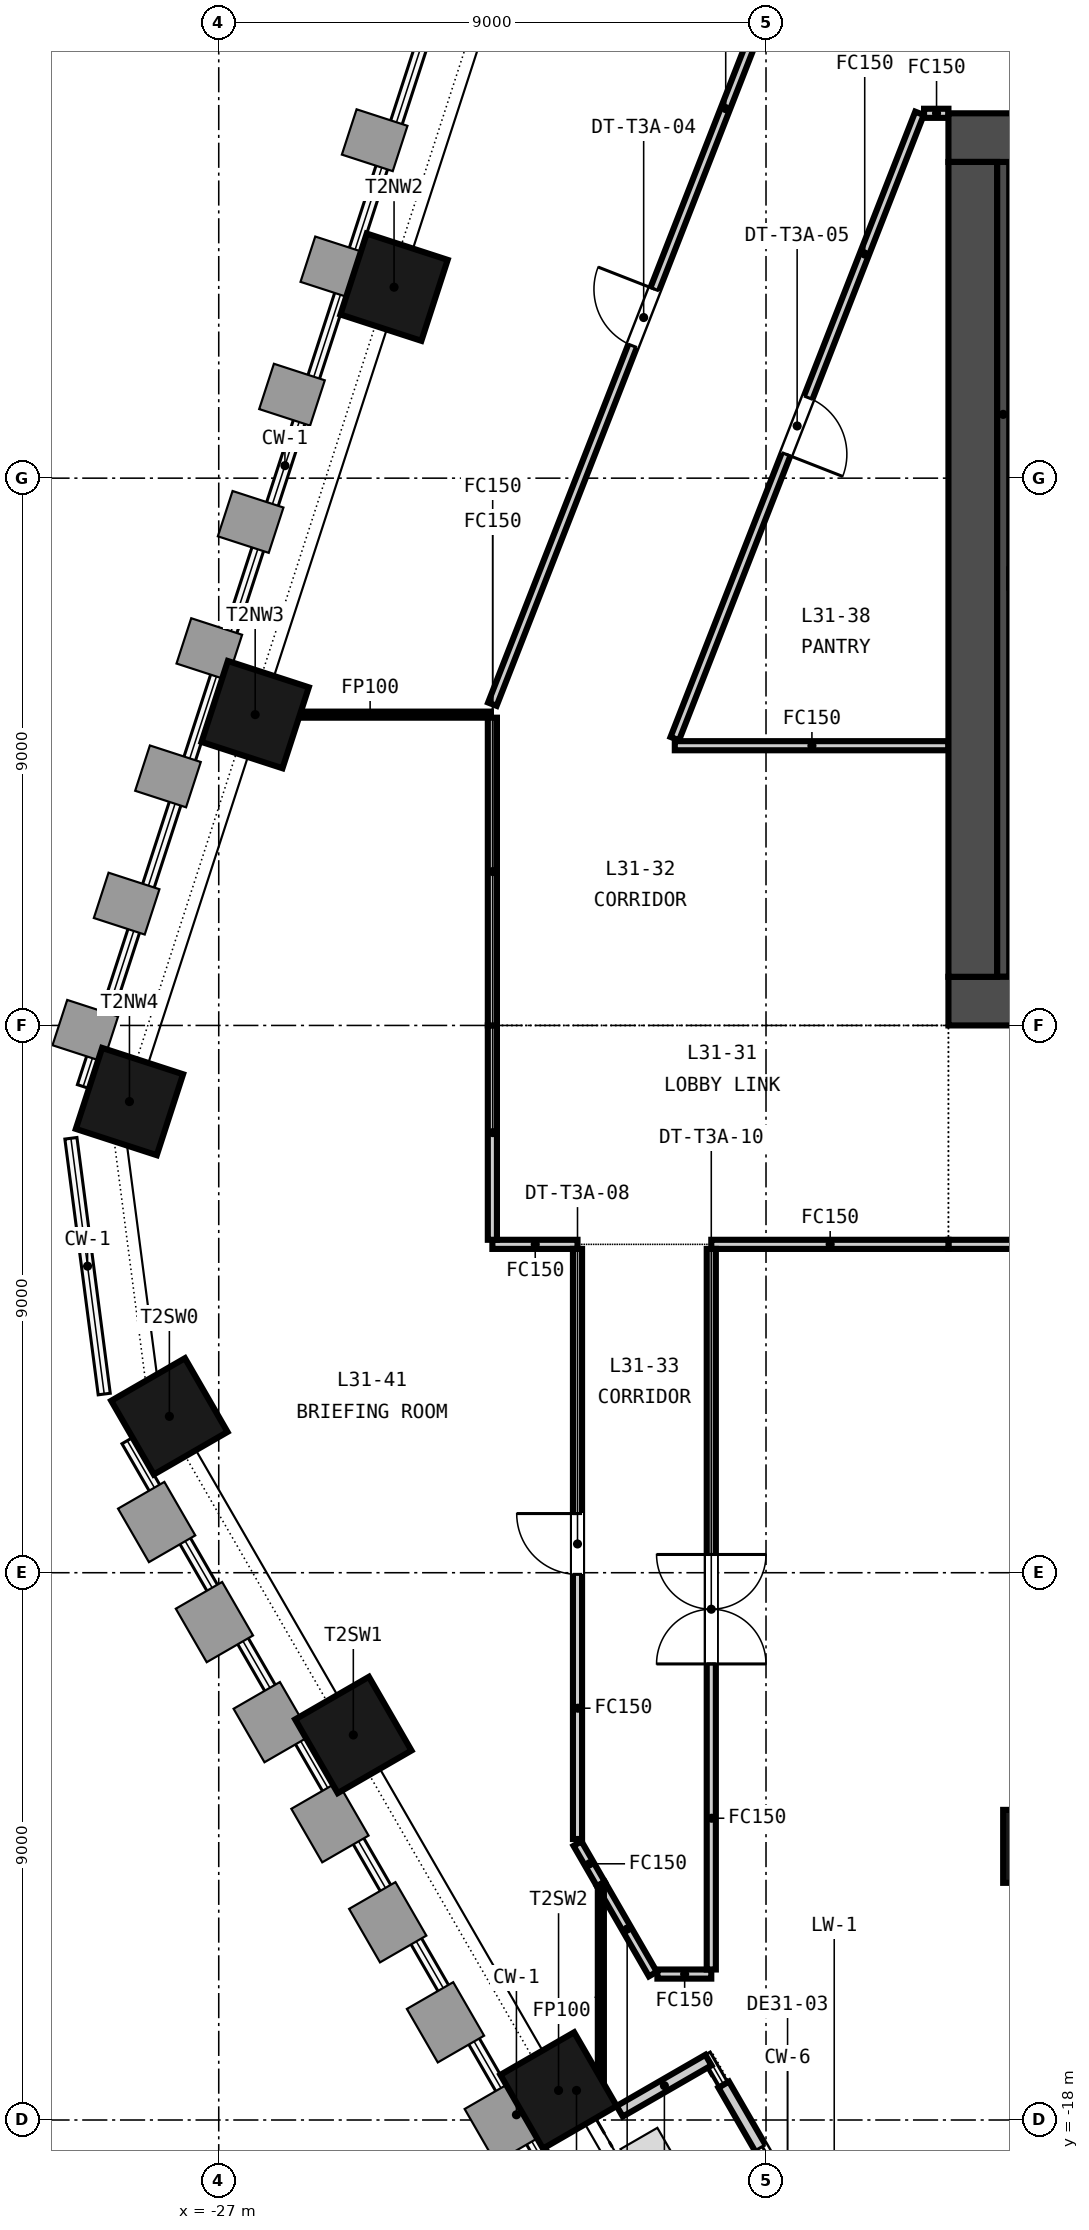
"""IFC4 building model, lengths in metres.
Left out: names, types, materials, properties, quantities, classifications, styles, units other than length and angle.
Written with IfcOpenShell. Run it as: python <this file> out.ifc"""

import sys

from ifc_helpers import new_model, si_unit, direction, frame, frame_2d, origin, origin_2d, place, context, subcontext, project, spatial, rectangle, extrude, element, fill, save


model = new_model("IFC4")
c1 = context("Model", 3, precision=1e-05, world=origin(), true_north=direction((0.0, 1.0)))
c2 = subcontext(c1, "Body", "Model", "MODEL_VIEW")
j1 = project(units=[si_unit("LENGTHUNIT", "METRE"), si_unit("PLANEANGLEUNIT", "RADIAN")], contexts=[c1])
p1 = place(None, origin())
s1 = spatial("IfcSite", under=j1, at=p1, CompositionType="ELEMENT")
p2 = place(p1, origin())
s2 = spatial("IfcBuilding", under=s1, at=p2, CompositionType="ELEMENT")
p3 = place(p2, frame((0.0, 0.0, 129.8)))
s3 = spatial("IfcBuildingStorey", under=s2, at=p3, CompositionType="ELEMENT", Elevation=129.8)
p4 = place(p3, frame((-15.0, 0.4, -0.15), z_axis=(0.0, 0.0, 1.0), x_axis=(1.0, 0.0, 0.0)))
e1 = element("IfcWall", 1, at=p4, inside=s3, PredefinedType="SOLIDWALL", context=c2, shape_type="SweptSolid", body=[
    extrude(rectangle(XDim=30.0, YDim=0.8, at=frame_2d((15.0, 0.0))), origin(), (0.0, 0.0, 1.0), 3.65),
])
p5 = place(p4, frame((5.8, 0.0, 0.15)))
e2 = element("IfcOpeningElement", 2, at=p5, cuts=e1, PredefinedType="OPENING", context=c2, shape_type="SweptSolid", body=[
    extrude(rectangle(XDim=2.4, YDim=2.4, at=frame_2d((1.2, 1.2))), frame((0.0, 0.41, 0.0), z_axis=(0.0, -1.0, 0.0), x_axis=(1.0, 0.0, 0.0)), (0.0, 0.0, 1.0), 0.82),
])
p6 = place(p4, frame((13.8, 0.0, 0.15)))
e3 = element("IfcOpeningElement", 3, at=p6, cuts=e1, PredefinedType="OPENING", context=c2, shape_type="SweptSolid", body=[
    extrude(rectangle(XDim=2.4, YDim=2.4, at=frame_2d((1.2, 1.2))), frame((0.0, 0.41, 0.0), z_axis=(0.0, -1.0, 0.0), x_axis=(1.0, 0.0, 0.0)), (0.0, 0.0, 1.0), 0.82),
])
p7 = place(p4, frame((21.8, 0.0, 0.15)))
e4 = element("IfcOpeningElement", 4, at=p7, cuts=e1, PredefinedType="OPENING", context=c2, shape_type="SweptSolid", body=[
    extrude(rectangle(XDim=2.4, YDim=2.4, at=frame_2d((1.2, 1.2))), frame((0.0, 0.41, 0.0), z_axis=(0.0, -1.0, 0.0), x_axis=(1.0, 0.0, 0.0)), (0.0, 0.0, 1.0), 0.82),
])
p8 = place(p4, frame((1.5, 0.0, 0.15)))
e5 = element("IfcOpeningElement", 5, at=p8, cuts=e1, PredefinedType="OPENING", context=c2, shape_type="SweptSolid", body=[
    extrude(rectangle(XDim=1.2, YDim=2.1, at=frame_2d((0.6, 1.05))), frame((0.0, 0.41, 0.0), z_axis=(0.0, -1.0, 0.0), x_axis=(1.0, 0.0, 0.0)), (0.0, 0.0, 1.0), 0.82),
])
p9 = place(p4, frame((27.3, 0.0, 0.15)))
e6 = element("IfcOpeningElement", 6, at=p9, cuts=e1, PredefinedType="OPENING", context=c2, shape_type="SweptSolid", body=[
    extrude(rectangle(XDim=1.2, YDim=2.1, at=frame_2d((0.6, 1.05))), frame((0.0, 0.41, 0.0), z_axis=(0.0, -1.0, 0.0), x_axis=(1.0, 0.0, 0.0)), (0.0, 0.0, 1.0), 0.82),
])
p10 = place(p3, frame((-15.0, 14.6, -0.15), z_axis=(0.0, 0.0, 1.0), x_axis=(1.0, 0.0, 0.0)))
e7 = element("IfcWall", 7, at=p10, inside=s3, PredefinedType="SOLIDWALL", context=c2, shape_type="SweptSolid", body=[
    extrude(rectangle(XDim=30.0, YDim=0.8, at=frame_2d((15.0, 0.0))), origin(), (0.0, 0.0, 1.0), 3.65),
])
p11 = place(p10, frame((9.25, 0.0, 0.15)))
e8 = element("IfcOpeningElement", 8, at=p11, cuts=e7, PredefinedType="OPENING", context=c2, shape_type="SweptSolid", body=[
    extrude(rectangle(XDim=1.5, YDim=2.1, at=frame_2d((0.75, 1.05))), frame((0.0, 0.41, 0.0), z_axis=(0.0, -1.0, 0.0), x_axis=(1.0, 0.0, 0.0)), (0.0, 0.0, 1.0), 0.82),
])
p12 = place(p10, frame((19.4, 0.0, 0.15)))
e9 = element("IfcOpeningElement", 9, at=p12, cuts=e7, PredefinedType="OPENING", context=c2, shape_type="SweptSolid", body=[
    extrude(rectangle(XDim=1.5, YDim=2.1, at=frame_2d((0.75, 1.05))), frame((0.0, 0.41, 0.0), z_axis=(0.0, -1.0, 0.0), x_axis=(1.0, 0.0, 0.0)), (0.0, 0.0, 1.0), 0.82),
])
p13 = place(p10, frame((1.5, 0.0, 0.15)))
e10 = element("IfcOpeningElement", 10, at=p13, cuts=e7, PredefinedType="OPENING", context=c2, shape_type="SweptSolid", body=[
    extrude(rectangle(XDim=1.2, YDim=2.1, at=frame_2d((0.6, 1.05))), frame((0.0, 0.41, 0.0), z_axis=(0.0, -1.0, 0.0), x_axis=(1.0, 0.0, 0.0)), (0.0, 0.0, 1.0), 0.82),
])
p14 = place(p10, frame((27.3, 0.0, 0.15)))
e11 = element("IfcOpeningElement", 11, at=p14, cuts=e7, PredefinedType="OPENING", context=c2, shape_type="SweptSolid", body=[
    extrude(rectangle(XDim=1.2, YDim=2.1, at=frame_2d((0.6, 1.05))), frame((0.0, 0.41, 0.0), z_axis=(0.0, -1.0, 0.0), x_axis=(1.0, 0.0, 0.0)), (0.0, 0.0, 1.0), 0.82),
])
p15 = place(p3, frame((-14.6, 0.8, -0.15), z_axis=(0.0, 0.0, 1.0), x_axis=(0.0, 1.0, 0.0)))
e12 = element("IfcWall", 12, at=p15, inside=s3, PredefinedType="SOLIDWALL", context=c2, shape_type="SweptSolid", body=[
    extrude(rectangle(XDim=13.4, YDim=0.8, at=frame_2d((6.7, 0.0))), origin(), (0.0, 0.0, 1.0), 3.65),
])
for number, where, z_axis, x_axis in (
    (13, (-24.117, 12.141, -0.15), (0.0, 0.0, 1.0), (-0.309, -0.951, 0.0)),
    (14, (-26.401, 5.111, -0.15), (0.0, 0.0, 1.0), (-0.309, -0.951, 0.0)),
    (15, (-28.468, -1.252, -0.15), (0.0, 0.0, 1.0), (-0.309, -0.951, 0.0)),
    (16, (-27.812, -6.429, -0.15), (0.0, 0.0, 1.0), (0.5, -0.866, 0.0)),
    (17, (-24.787, -11.668, -0.15), (0.0, 0.0, 1.0), (0.5, -0.866, 0.0)),
    (18, (-21.412, -17.514, -0.15), (0.0, 0.0, 1.0), (0.5, -0.866, 0.0)),
):
    element("IfcColumn", number, at=place(p3, frame(where, z_axis=z_axis, x_axis=x_axis)), inside=s3, PredefinedType="COLUMN", context=c2, shape_type="SweptSolid", body=[
        extrude(rectangle(XDim=1.4, YDim=1.4, at=origin_2d()), origin(), (0.0, 0.0, 1.0), 3.65),
    ])
p16 = place(p3, frame((-13.5, -13.5, -0.15), z_axis=(0.0, 0.0, 1.0), x_axis=(1.0, 0.0, 0.0)))
e19 = element("IfcColumn", 19, at=p16, inside=s3, PredefinedType="COLUMN", context=c2, shape_type="SweptSolid", body=[
    extrude(rectangle(XDim=1.2, YDim=1.2, at=origin_2d()), origin(), (0.0, 0.0, 1.0), 3.65),
])
p17 = place(p3, frame((-18.696, -17.418, 0.0), z_axis=(0.0, 0.0, 1.0), x_axis=(0.49998411664, -0.866034573852, 0.0)))
e20 = element("IfcWall", 20, at=p17, inside=s3, PredefinedType="SOLIDWALL", context=c2, shape_type="SweptSolid", body=[
    extrude(rectangle(XDim=4.2, YDim=0.2, at=frame_2d((2.1, 0.0))), origin(), (0.0, 0.0, 1.0), 3.05),
])
p18 = place(p17, frame((1.2, 0.0, 0.0)))
e21 = element("IfcOpeningElement", 21, at=p18, cuts=e20, PredefinedType="OPENING", context=c2, shape_type="SweptSolid", body=[
    extrude(rectangle(XDim=1.8, YDim=2.4, at=frame_2d((0.9, 1.2))), frame((0.0, 0.11, 0.0), z_axis=(0.0, -1.0, 0.0), x_axis=(1.0, 0.0, 0.0)), (0.0, 0.0, 1.0), 0.22),
])
p19 = place(p3, frame((-20.406, -17.857, 0.0), z_axis=(0.0, 0.0, 1.0), x_axis=(0.866031085144, 0.499990159468, 0.0)))
e22 = element("IfcWall", 22, at=p19, inside=s3, PredefinedType="SOLIDWALL", context=c2, shape_type="SweptSolid", body=[
    extrude(rectangle(XDim=1.684, YDim=0.2, at=frame_2d((0.842, 0.0))), origin(), (0.0, 0.0, 1.0), 3.05),
])
p20 = place(p3, frame((-14.1, 0.8, 0.0), z_axis=(0.0, 0.0, 1.0), x_axis=(0.0, 1.0, 0.0)))
e23 = element("IfcWall", 23, at=p20, inside=s3, PredefinedType="SOLIDWALL", context=c2, shape_type="SweptSolid", body=[
    extrude(rectangle(XDim=13.4, YDim=0.2, at=frame_2d((6.7, 0.0))), origin(), (0.0, 0.0, 1.0), 3.5),
])
p21 = place(p3, frame((15.0, -3.6, 0.0), z_axis=(0.0, 0.0, 1.0), x_axis=(-1.0, 0.0, 0.0)))
e24 = element("IfcWall", 24, at=p21, inside=s3, PredefinedType="PARTITIONING", context=c2, shape_type="SweptSolid", body=[
    extrude(rectangle(XDim=30.0, YDim=0.15, at=frame_2d((15.0, 0.0))), origin(), (0.0, 0.0, 1.0), 2.741),
])
p22 = place(p21, frame((14.1, 0.0, 0.0)))
e25 = element("IfcOpeningElement", 25, at=p22, cuts=e24, PredefinedType="OPENING", context=c2, shape_type="SweptSolid", body=[
    extrude(rectangle(XDim=1.8, YDim=2.1, at=frame_2d((0.9, 1.05))), frame((0.0, 0.085, 0.0), z_axis=(0.0, -1.0, 0.0), x_axis=(1.0, 0.0, 0.0)), (0.0, 0.0, 1.0), 0.17),
])
p23 = place(p3, frame((-21.1, -3.6, 0.0), z_axis=(0.0, 0.0, 1.0), x_axis=(-1.0, 0.0, 0.0)))
e26 = element("IfcWall", 26, at=p23, inside=s3, PredefinedType="PARTITIONING", context=c2, shape_type="SweptSolid", body=[
    extrude(rectangle(XDim=1.4, YDim=0.15, at=frame_2d((0.7, 0.0))), origin(), (0.0, 0.0, 1.0), 2.741),
])
p24 = place(p3, frame((-15.0, -3.6, 0.0), z_axis=(0.0, 0.0, 1.0), x_axis=(-1.0, 0.0, 0.0)))
e27 = element("IfcWall", 27, at=p24, inside=s3, PredefinedType="PARTITIONING", context=c2, shape_type="SweptSolid", body=[
    extrude(rectangle(XDim=3.9, YDim=0.15, at=frame_2d((1.95, 0.0))), origin(), (0.0, 0.0, 1.0), 2.741),
])
p25 = place(p3, frame((-15.476, 15.0, 0.0), z_axis=(0.0, 0.0, 1.0), x_axis=(-0.364411853206, -0.931237886494, 0.0)))
e28 = element("IfcWall", 28, at=p25, inside=s3, PredefinedType="PARTITIONING", context=c2, shape_type="SweptSolid", body=[
    extrude(rectangle(XDim=11.042, YDim=0.15, at=frame_2d((5.521, 0.0))), origin(), (0.0, 0.0, 1.0), 2.741),
])
p26 = place(p25, frame((5.021, 0.0, 0.0)))
e29 = element("IfcOpeningElement", 29, at=p26, cuts=e28, PredefinedType="OPENING", context=c2, shape_type="SweptSolid", body=[
    extrude(rectangle(XDim=1.0, YDim=2.1, at=frame_2d((0.5, 1.05))), frame((0.0, 0.085, 0.0), z_axis=(0.0, -1.0, 0.0), x_axis=(1.0, 0.0, 0.0)), (0.0, 0.0, 1.0), 0.17),
])
p27 = place(p3, frame((-15.0, 15.0, 0.0), z_axis=(0.0, 0.0, 1.0), x_axis=(-1.0, 0.0, 0.0)))
e30 = element("IfcWall", 30, at=p27, inside=s3, PredefinedType="PARTITIONING", context=c2, shape_type="SweptSolid", body=[
    extrude(rectangle(XDim=0.401, YDim=0.15, at=frame_2d((0.2, 0.0))), origin(), (0.0, 0.0, 1.0), 2.741),
])
p28 = place(p3, frame((-20.716, -14.119, 0.0), z_axis=(0.0, 0.0, 1.0), x_axis=(-0.500208722528, 0.865904864236, 0.0)))
e31 = element("IfcWall", 31, at=p28, inside=s3, PredefinedType="PARTITIONING", context=c2, shape_type="SweptSolid", body=[
    extrude(rectangle(XDim=0.768, YDim=0.15, at=frame_2d((0.384, 0.0))), origin(), (0.0, 0.0, 1.0), 2.741),
])
p29 = place(p3, frame((-19.861, -15.6, 0.0), z_axis=(0.0, 0.0, 1.0), x_axis=(-0.499916050814, 0.866073866445, 0.0)))
e32 = element("IfcWall", 32, at=p29, inside=s3, PredefinedType="PARTITIONING", context=c2, shape_type="SweptSolid", body=[
    extrude(rectangle(XDim=1.71, YDim=0.15, at=frame_2d((0.855, 0.0))), origin(), (0.0, 0.0, 1.0), 2.741),
])
p30 = place(p3, frame((-18.9, -15.6, 0.0), z_axis=(0.0, 0.0, 1.0), x_axis=(-1.0, 0.0, 0.0)))
e33 = element("IfcWall", 33, at=p30, inside=s3, PredefinedType="PARTITIONING", context=c2, shape_type="SweptSolid", body=[
    extrude(rectangle(XDim=0.886, YDim=0.15, at=frame_2d((0.443, 0.0))), origin(), (0.0, 0.0, 1.0), 2.741),
])
p31 = place(p3, frame((-18.9, -3.675, 0.0), z_axis=(0.0, 0.0, 1.0), x_axis=(0.0, -1.0, 0.0)))
e34 = element("IfcWall", 34, at=p31, inside=s3, PredefinedType="PARTITIONING", context=c2, shape_type="SweptSolid", body=[
    extrude(rectangle(XDim=11.85, YDim=0.15, at=frame_2d((5.925, 0.0))), origin(), (0.0, 0.0, 1.0), 2.741),
])
p32 = place(p31, frame((5.025, 0.0, 0.0)))
e35 = element("IfcOpeningElement", 35, at=p32, cuts=e34, PredefinedType="OPENING", context=c2, shape_type="SweptSolid", body=[
    extrude(rectangle(XDim=1.8, YDim=2.1, at=frame_2d((0.9, 1.05))), frame((0.0, 0.085, 0.0), z_axis=(0.0, -1.0, 0.0), x_axis=(1.0, 0.0, 0.0)), (0.0, 0.0, 1.0), 0.17),
])
p33 = place(p3, frame((-22.5, 5.283, 0.0), z_axis=(0.0, 0.0, 1.0), x_axis=(0.364389237236, 0.931246736256, 0.0)))
e36 = element("IfcWall", 36, at=p33, inside=s3, PredefinedType="PARTITIONING", context=c2, shape_type="SweptSolid", body=[
    extrude(rectangle(XDim=13.656, YDim=0.15, at=frame_2d((6.828, 0.0))), origin(), (0.0, 0.0, 1.0), 2.741),
])
p34 = place(p33, frame((6.328, 0.0, 0.0)))
e37 = element("IfcOpeningElement", 37, at=p34, cuts=e36, PredefinedType="OPENING", context=c2, shape_type="SweptSolid", body=[
    extrude(rectangle(XDim=1.0, YDim=2.1, at=frame_2d((0.5, 1.05))), frame((0.0, 0.085, 0.0), z_axis=(0.0, -1.0, 0.0), x_axis=(1.0, 0.0, 0.0)), (0.0, 0.0, 1.0), 0.17),
])
p35 = place(p3, frame((-26.506, 5.111, 0.0), z_axis=(0.0, 0.0, 1.0), x_axis=(1.0, 0.0, 0.0)))
e38 = element("IfcWall", 38, at=p35, inside=s3, PredefinedType="PARTITIONING", context=c2, shape_type="SweptSolid", body=[
    extrude(rectangle(XDim=3.981, YDim=0.1, at=frame_2d((1.991, 0.0))), origin(), (0.0, 0.0, 1.0), 2.741),
])
p36 = place(p3, frame((-19.5, 4.6, 0.0), z_axis=(0.0, 0.0, 1.0), x_axis=(1.0, 0.0, 0.0)))
e39 = element("IfcWall", 39, at=p36, inside=s3, PredefinedType="PARTITIONING", context=c2, shape_type="SweptSolid", body=[
    extrude(rectangle(XDim=4.5, YDim=0.15, at=frame_2d((2.25, 0.0))), origin(), (0.0, 0.0, 1.0), 2.741),
])
p37 = place(p3, frame((-22.5, -3.525, 0.0), z_axis=(0.0, 0.0, 1.0), x_axis=(0.0, 1.0, 0.0)))
e40 = element("IfcWall", 40, at=p37, inside=s3, PredefinedType="PARTITIONING", context=c2, shape_type="SweptSolid", body=[
    extrude(rectangle(XDim=3.525, YDim=0.15, at=frame_2d((1.762, 0.0))), origin(), (0.0, 0.0, 1.0), 2.741),
])
p38 = place(p3, frame((-22.5, 0.0, 0.0), z_axis=(0.0, 0.0, 1.0), x_axis=(0.0, 1.0, 0.0)))
e41 = element("IfcWall", 41, at=p38, inside=s3, PredefinedType="PARTITIONING", context=c2, shape_type="SweptSolid", body=[
    extrude(rectangle(XDim=5.061, YDim=0.15, at=frame_2d((2.531, 0.0))), origin(), (0.0, 0.0, 1.0), 2.741),
])
p39 = place(p3, frame((-21.1, -13.379, 0.0), z_axis=(0.0, 0.0, 1.0), x_axis=(0.0, 1.0, 0.0)))
e42 = element("IfcWall", 42, at=p39, inside=s3, PredefinedType="PARTITIONING", context=c2, shape_type="SweptSolid", body=[
    extrude(rectangle(XDim=9.704, YDim=0.15, at=frame_2d((4.852, 0.0))), origin(), (0.0, 0.0, 1.0), 2.741),
])
p40 = place(p39, frame((4.352, 0.0, 0.0)))
e43 = element("IfcOpeningElement", 43, at=p40, cuts=e42, PredefinedType="OPENING", context=c2, shape_type="SweptSolid", body=[
    extrude(rectangle(XDim=1.0, YDim=2.1, at=frame_2d((0.5, 1.05))), frame((0.0, 0.085, 0.0), z_axis=(0.0, -1.0, 0.0), x_axis=(1.0, 0.0, 0.0)), (0.0, 0.0, 1.0), 0.17),
])
p41 = place(p3, frame((-21.527, -17.514, 0.0), z_axis=(0.0, 0.0, 1.0), x_axis=(1.0, 0.0, 0.0)))
e44 = element("IfcWall", 44, at=p41, inside=s3, PredefinedType="PARTITIONING", context=c2, shape_type="SweptSolid", body=[
    extrude(rectangle(XDim=0.811, YDim=0.1, at=frame_2d((0.406, 0.0))), origin(), (0.0, 0.0, 1.0), 2.741),
])
p42 = place(p3, frame((-20.716, -17.464, 0.0), z_axis=(0.0, 0.0, 1.0), x_axis=(0.0, 1.0, 0.0)))
e45 = element("IfcWall", 45, at=p42, inside=s3, PredefinedType="PARTITIONING", context=c2, shape_type="SweptSolid", body=[
    extrude(rectangle(XDim=3.27, YDim=0.1, at=frame_2d((1.635, 0.0))), origin(), (0.0, 0.0, 1.0), 2.741),
])
p43 = place(p18, origin())
e46 = element("IfcDoor", 46, at=p43, inside=s3, OperationType="SINGLE_SWING_LEFT", PredefinedType="DOOR", context=c2, shape_type="SweptSolid", body=[
    extrude(rectangle(XDim=1.8, YDim=2.4, at=frame_2d((0.9, 1.2))), frame((0.0, 0.025, 0.0), z_axis=(0.0, -1.0, 0.0), x_axis=(1.0, 0.0, 0.0)), (0.0, 0.0, 1.0), 0.05),
])
fill(e21, e46)
p44 = place(p34, origin())
e47 = element("IfcDoor", 47, at=p44, inside=s3, OperationType="SINGLE_SWING_RIGHT", PredefinedType="DOOR", context=c2, shape_type="SweptSolid", body=[
    extrude(rectangle(XDim=1.0, YDim=2.1, at=frame_2d((0.5, 1.05))), frame((0.0, 0.025, 0.0), z_axis=(0.0, -1.0, 0.0), x_axis=(1.0, 0.0, 0.0)), (0.0, 0.0, 1.0), 0.05),
])
fill(e37, e47)
p45 = place(p26, origin())
e48 = element("IfcDoor", 48, at=p45, inside=s3, OperationType="SINGLE_SWING_RIGHT", PredefinedType="DOOR", context=c2, shape_type="SweptSolid", body=[
    extrude(rectangle(XDim=1.0, YDim=2.1, at=frame_2d((0.5, 1.05))), frame((0.0, 0.025, 0.0), z_axis=(0.0, -1.0, 0.0), x_axis=(1.0, 0.0, 0.0)), (0.0, 0.0, 1.0), 0.05),
])
fill(e29, e48)
p46 = place(p40, origin())
e49 = element("IfcDoor", 49, at=p46, inside=s3, OperationType="SINGLE_SWING_RIGHT", PredefinedType="DOOR", context=c2, shape_type="SweptSolid", body=[
    extrude(rectangle(XDim=1.0, YDim=2.1, at=frame_2d((0.5, 1.05))), frame((0.0, 0.025, 0.0), z_axis=(0.0, -1.0, 0.0), x_axis=(1.0, 0.0, 0.0)), (0.0, 0.0, 1.0), 0.05),
])
fill(e43, e49)
p47 = place(p32, origin())
e50 = element("IfcDoor", 50, at=p47, inside=s3, OperationType="DOUBLE_DOOR_DOUBLE_SWING", PredefinedType="DOOR", context=c2, shape_type="SweptSolid", body=[
    extrude(rectangle(XDim=1.8, YDim=2.1, at=frame_2d((0.9, 1.05))), frame((0.0, 0.025, 0.0), z_axis=(0.0, -1.0, 0.0), x_axis=(1.0, 0.0, 0.0)), (0.0, 0.0, 1.0), 0.05),
])
fill(e35, e50)
save(model, sys.argv[1])
